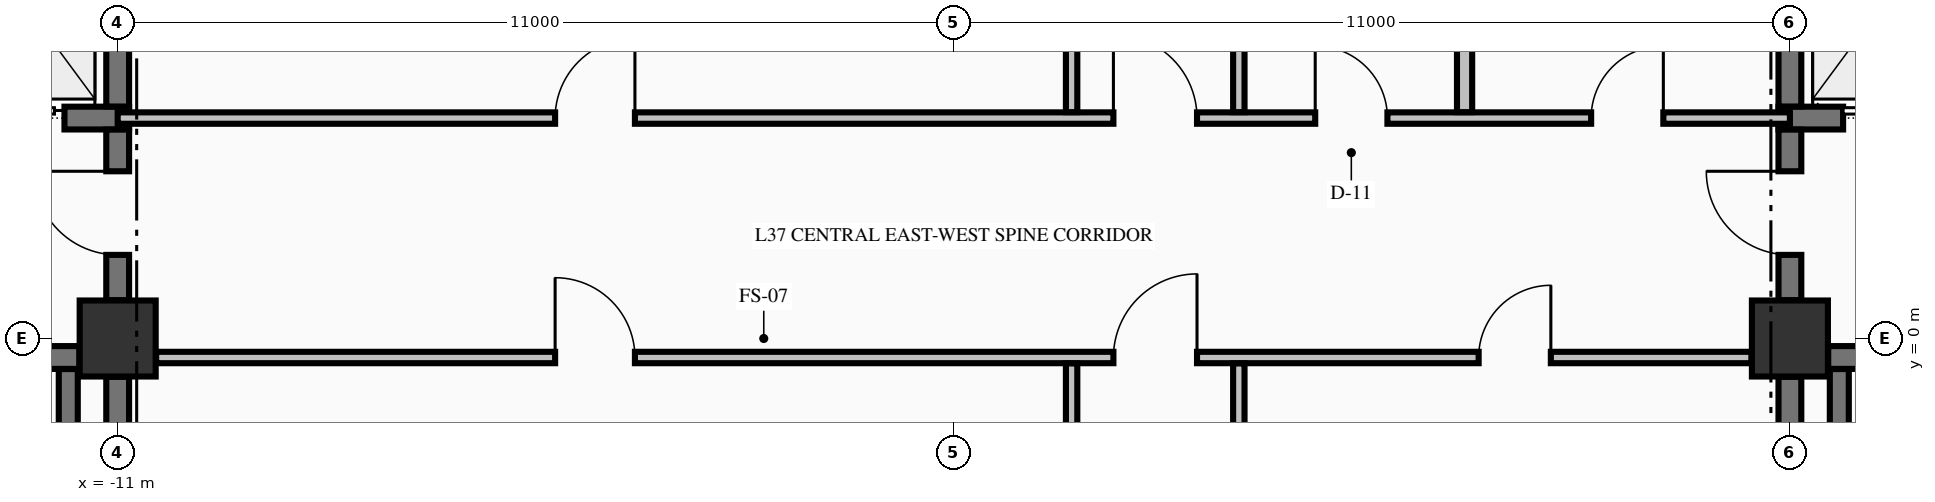
"""IFC4 building model, lengths in metres.
Left out: names, types, materials, properties, quantities, classifications, styles, units other than length and angle.
Written with IfcOpenShell. Run it as: python <this file> out.ifc"""

import sys

from ifc_helpers import new_model, si_unit, direction, frame, frame_2d, origin, origin_2d, place, context, subcontext, project, spatial, rectangle, extrude, element, fill, save


model = new_model("IFC4")
c1 = context("Model", 3, precision=1e-05, world=origin(), true_north=direction((0.0, 1.0)))
c2 = subcontext(c1, "Body", "Model", "MODEL_VIEW")
j1 = project(units=[si_unit("LENGTHUNIT", "METRE"), si_unit("PLANEANGLEUNIT", "RADIAN")], contexts=[c1])
p1 = place(None, origin())
s1 = spatial("IfcSite", under=j1, at=p1, CompositionType="ELEMENT")
p2 = place(p1, origin())
s2 = spatial("IfcBuilding", under=s1, at=p2, CompositionType="ELEMENT")
p3 = place(p2, frame((0.0, 0.0, 146.34)))
s3 = spatial("IfcBuildingStorey", under=s2, at=p3, CompositionType="ELEMENT", Elevation=146.34)
for number, where, z_axis, x_axis in (
    (1, (-11.0, 0.0, -0.25), (0.0, 0.0, 1.0), (1.0, 0.0, 0.0)),
    (2, (11.0, 0.0, -0.25), (0.0, 0.0, 1.0), (1.0, 0.0, 0.0)),
):
    element("IfcColumn", number, at=place(p3, frame(where, z_axis=z_axis, x_axis=x_axis)), inside=s3, PredefinedType="COLUMN", context=c2, shape_type="SweptSolid", body=[
        extrude(rectangle(XDim=1.0, YDim=1.0, at=origin_2d()), origin(), (0.0, 0.0, 1.0), 3.57),
    ])
p4 = place(p3, frame((-19.496, -0.25, 0.0), z_axis=(0.0, 0.0, 1.0), x_axis=(1.0, 0.0, 0.0)))
e3 = element("IfcWall", 3, at=p4, inside=s3, PredefinedType="SHEAR", context=c2, shape_type="SweptSolid", body=[
    extrude(rectangle(XDim=7.992, YDim=0.3, at=frame_2d((3.996, 0.0))), origin(), (0.0, 0.0, 1.0), 3.32),
])
p5 = place(p4, frame((5.796, 0.0, 0.0)))
e4 = element("IfcOpeningElement", 4, at=p5, cuts=e3, PredefinedType="OPENING", context=c2, shape_type="SweptSolid", body=[
    extrude(rectangle(XDim=1.1, YDim=2.15, at=frame_2d((0.55, 1.075))), frame((0.0, 0.16, 0.0), z_axis=(0.0, -1.0, 0.0), x_axis=(1.0, 0.0, 0.0)), (0.0, 0.0, 1.0), 0.32),
])
p6 = place(p3, frame((11.504, -0.25, 0.0), z_axis=(0.0, 0.0, 1.0), x_axis=(1.0, 0.0, 0.0)))
e5 = element("IfcWall", 5, at=p6, inside=s3, PredefinedType="SHEAR", context=c2, shape_type="SweptSolid", body=[
    extrude(rectangle(XDim=3.371, YDim=0.3, at=frame_2d((1.686, 0.0))), origin(), (0.0, 0.0, 1.0), 3.32),
])
p7 = place(p6, frame((1.096, 0.0, 0.0)))
e6 = element("IfcOpeningElement", 6, at=p7, cuts=e5, PredefinedType="OPENING", context=c2, shape_type="SweptSolid", body=[
    extrude(rectangle(XDim=1.1, YDim=2.15, at=frame_2d((0.55, 1.075))), frame((0.0, 0.16, 0.0), z_axis=(0.0, -1.0, 0.0), x_axis=(1.0, 0.0, 0.0)), (0.0, 0.0, 1.0), 0.32),
])
p8 = place(p3, frame((-14.875, 2.9, 0.0), z_axis=(0.0, 0.0, 1.0), x_axis=(1.0, 0.0, 0.0)))
e7 = element("IfcWall", 7, at=p8, inside=s3, PredefinedType="SHEAR", context=c2, shape_type="SweptSolid", body=[
    extrude(rectangle(XDim=4.025, YDim=0.3, at=frame_2d((2.012, 0.0))), origin(), (0.0, 0.0, 1.0), 3.32),
])
p9 = place(p8, frame((2.075, 0.0, 0.0)))
e8 = element("IfcOpeningElement", 8, at=p9, cuts=e7, PredefinedType="OPENING", context=c2, shape_type="SweptSolid", body=[
    extrude(rectangle(XDim=1.1, YDim=2.2, at=frame_2d((0.55, 1.1))), frame((0.0, 0.16, 0.0), z_axis=(0.0, -1.0, 0.0), x_axis=(1.0, 0.0, 0.0)), (0.0, 0.0, 1.0), 0.32),
])
p10 = place(p3, frame((10.85, 2.9, 0.0), z_axis=(0.0, 0.0, 1.0), x_axis=(1.0, 0.0, 0.0)))
e9 = element("IfcWall", 9, at=p10, inside=s3, PredefinedType="SHEAR", context=c2, shape_type="SweptSolid", body=[
    extrude(rectangle(XDim=4.025, YDim=0.3, at=frame_2d((2.012, 0.0))), origin(), (0.0, 0.0, 1.0), 3.32),
])
p11 = place(p10, frame((0.85, 0.0, 0.0)))
e10 = element("IfcOpeningElement", 10, at=p11, cuts=e9, PredefinedType="OPENING", context=c2, shape_type="SweptSolid", body=[
    extrude(rectangle(XDim=1.1, YDim=2.2, at=frame_2d((0.55, 1.1))), frame((0.0, 0.16, 0.0), z_axis=(0.0, -1.0, 0.0), x_axis=(1.0, 0.0, 0.0)), (0.0, 0.0, 1.0), 0.32),
])
p12 = place(p3, frame((-10.494, -0.25, 0.0), z_axis=(0.0, 0.0, 1.0), x_axis=(1.0, 0.0, 0.0)))
e11 = element("IfcWall", 11, at=p12, inside=s3, PredefinedType="PARTITIONING", context=c2, shape_type="SweptSolid", body=[
    extrude(rectangle(XDim=20.988, YDim=0.15, at=frame_2d((10.494, 0.0))), origin(), (0.0, 0.0, 1.0), 3.32),
])
p13 = place(p12, frame((12.594, 0.0, 0.0)))
e12 = element("IfcOpeningElement", 12, at=p13, cuts=e11, PredefinedType="OPENING", context=c2, shape_type="SweptSolid", body=[
    extrude(rectangle(XDim=1.1, YDim=2.15, at=frame_2d((0.55, 1.075))), frame((0.0, 0.085, 0.0), z_axis=(0.0, -1.0, 0.0), x_axis=(1.0, 0.0, 0.0)), (0.0, 0.0, 1.0), 0.17),
])
p14 = place(p12, frame((5.249, 0.0, 0.0)))
e13 = element("IfcOpeningElement", 13, at=p14, cuts=e11, PredefinedType="OPENING", context=c2, shape_type="SweptSolid", body=[
    extrude(rectangle(XDim=1.05, YDim=2.15, at=frame_2d((0.525, 1.075))), frame((0.0, 0.085, 0.0), z_axis=(0.0, -1.0, 0.0), x_axis=(1.0, 0.0, 0.0)), (0.0, 0.0, 1.0), 0.17),
])
p15 = place(p12, frame((17.399, 0.0, 0.0)))
e14 = element("IfcOpeningElement", 14, at=p15, cuts=e11, PredefinedType="OPENING", context=c2, shape_type="SweptSolid", body=[
    extrude(rectangle(XDim=0.95, YDim=2.15, at=frame_2d((0.475, 1.075))), frame((0.0, 0.085, 0.0), z_axis=(0.0, -1.0, 0.0), x_axis=(1.0, 0.0, 0.0)), (0.0, 0.0, 1.0), 0.17),
])
p16 = place(p3, frame((-11.0, 2.9, 0.0), z_axis=(0.0, 0.0, 1.0), x_axis=(1.0, 0.0, 0.0)))
e15 = element("IfcWall", 15, at=p16, inside=s3, PredefinedType="PARTITIONING", context=c2, shape_type="SweptSolid", body=[
    extrude(rectangle(XDim=22.0, YDim=0.15, at=frame_2d((11.0, 0.0))), origin(), (0.0, 0.0, 1.0), 3.32),
])
p17 = place(p16, frame((13.1, 0.0, 0.0)))
e16 = element("IfcOpeningElement", 16, at=p17, cuts=e15, PredefinedType="OPENING", context=c2, shape_type="SweptSolid", body=[
    extrude(rectangle(XDim=1.1, YDim=2.15, at=frame_2d((0.55, 1.075))), frame((0.0, 0.085, 0.0), z_axis=(0.0, -1.0, 0.0), x_axis=(1.0, 0.0, 0.0)), (0.0, 0.0, 1.0), 0.17),
])
p18 = place(p16, frame((5.755, 0.0, 0.0)))
e17 = element("IfcOpeningElement", 17, at=p18, cuts=e15, PredefinedType="OPENING", context=c2, shape_type="SweptSolid", body=[
    extrude(rectangle(XDim=1.05, YDim=2.15, at=frame_2d((0.525, 1.075))), frame((0.0, 0.085, 0.0), z_axis=(0.0, -1.0, 0.0), x_axis=(1.0, 0.0, 0.0)), (0.0, 0.0, 1.0), 0.17),
])
p19 = place(p16, frame((15.755, 0.0, 0.0)))
e18 = element("IfcOpeningElement", 18, at=p19, cuts=e15, PredefinedType="OPENING", context=c2, shape_type="SweptSolid", body=[
    extrude(rectangle(XDim=0.95, YDim=2.15, at=frame_2d((0.475, 1.075))), frame((0.0, 0.085, 0.0), z_axis=(0.0, -1.0, 0.0), x_axis=(1.0, 0.0, 0.0)), (0.0, 0.0, 1.0), 0.17),
])
p20 = place(p16, frame((19.385, 0.0, 0.0)))
e19 = element("IfcOpeningElement", 19, at=p20, cuts=e15, PredefinedType="OPENING", context=c2, shape_type="SweptSolid", body=[
    extrude(rectangle(XDim=0.95, YDim=2.15, at=frame_2d((0.475, 1.075))), frame((0.0, 0.085, 0.0), z_axis=(0.0, -1.0, 0.0), x_axis=(1.0, 0.0, 0.0)), (0.0, 0.0, 1.0), 0.17),
])
p21 = place(p3, frame((-11.65, -9.798, 0.0), z_axis=(0.0, 0.0, 1.0), x_axis=(0.0, 1.0, 0.0)))
e20 = element("IfcWall", 20, at=p21, inside=s3, PredefinedType="SOLIDWALL", context=c2, shape_type="SweptSolid", body=[
    extrude(rectangle(XDim=9.396, YDim=0.25, at=frame_2d((4.698, 0.0))), origin(), (0.0, 0.0, 1.0), 3.32),
])
p22 = place(p3, frame((-11.0, -9.446, 0.0), z_axis=(0.0, 0.0, 1.0), x_axis=(0.0, 1.0, 0.0)))
e21 = element("IfcWall", 21, at=p22, inside=s3, PredefinedType="SHEAR", context=c2, shape_type="SweptSolid", body=[
    extrude(rectangle(XDim=8.942, YDim=0.3, at=frame_2d((4.471, 0.0))), origin(), (0.0, 0.0, 1.0), 3.32),
])
p23 = place(p3, frame((-11.0, 0.504, 0.0), z_axis=(0.0, 0.0, 1.0), x_axis=(0.0, 1.0, 0.0)))
e22 = element("IfcWall", 22, at=p23, inside=s3, PredefinedType="SHEAR", context=c2, shape_type="SweptSolid", body=[
    extrude(rectangle(XDim=2.244, YDim=0.3, at=frame_2d((1.122, 0.0))), origin(), (0.0, 0.0, 1.0), 3.32),
])
p24 = place(p23, frame((0.596, 0.0, 0.0)))
e23 = element("IfcOpeningElement", 23, at=p24, cuts=e22, PredefinedType="OPENING", context=c2, shape_type="SweptSolid", body=[
    extrude(rectangle(XDim=1.1, YDim=2.15, at=frame_2d((0.55, 1.075))), frame((0.0, 0.16, 0.0), z_axis=(0.0, -1.0, 0.0), x_axis=(1.0, 0.0, 0.0)), (0.0, 0.0, 1.0), 0.32),
])
p25 = place(p3, frame((-11.0, 3.052, 0.0), z_axis=(0.0, 0.0, 1.0), x_axis=(0.0, 1.0, 0.0)))
e24 = element("IfcWall", 24, at=p25, inside=s3, PredefinedType="SHEAR", context=c2, shape_type="SweptSolid", body=[
    extrude(rectangle(XDim=2.496, YDim=0.3, at=frame_2d((1.248, 0.0))), origin(), (0.0, 0.0, 1.0), 3.32),
])
p26 = place(p3, frame((11.0, -9.446, 0.0), z_axis=(0.0, 0.0, 1.0), x_axis=(0.0, 1.0, 0.0)))
e25 = element("IfcWall", 25, at=p26, inside=s3, PredefinedType="SHEAR", context=c2, shape_type="SweptSolid", body=[
    extrude(rectangle(XDim=8.942, YDim=0.3, at=frame_2d((4.471, 0.0))), origin(), (0.0, 0.0, 1.0), 3.32),
])
p27 = place(p3, frame((11.0, 0.504, 0.0), z_axis=(0.0, 0.0, 1.0), x_axis=(0.0, 1.0, 0.0)))
e26 = element("IfcWall", 26, at=p27, inside=s3, PredefinedType="SHEAR", context=c2, shape_type="SweptSolid", body=[
    extrude(rectangle(XDim=2.244, YDim=0.3, at=frame_2d((1.122, 0.0))), origin(), (0.0, 0.0, 1.0), 3.32),
])
p28 = place(p27, frame((0.596, 0.0, 0.0)))
e27 = element("IfcOpeningElement", 27, at=p28, cuts=e26, PredefinedType="OPENING", context=c2, shape_type="SweptSolid", body=[
    extrude(rectangle(XDim=1.1, YDim=2.15, at=frame_2d((0.55, 1.075))), frame((0.0, 0.16, 0.0), z_axis=(0.0, -1.0, 0.0), x_axis=(1.0, 0.0, 0.0)), (0.0, 0.0, 1.0), 0.32),
])
p29 = place(p3, frame((11.0, 3.052, 0.0), z_axis=(0.0, 0.0, 1.0), x_axis=(0.0, 1.0, 0.0)))
e28 = element("IfcWall", 28, at=p29, inside=s3, PredefinedType="SHEAR", context=c2, shape_type="SweptSolid", body=[
    extrude(rectangle(XDim=2.496, YDim=0.3, at=frame_2d((1.248, 0.0))), origin(), (0.0, 0.0, 1.0), 3.32),
])
p30 = place(p3, frame((11.65, -9.798, 0.0), z_axis=(0.0, 0.0, 1.0), x_axis=(0.0, 1.0, 0.0)))
e29 = element("IfcWall", 29, at=p30, inside=s3, PredefinedType="SOLIDWALL", context=c2, shape_type="SweptSolid", body=[
    extrude(rectangle(XDim=9.396, YDim=0.25, at=frame_2d((4.698, 0.0))), origin(), (0.0, 0.0, 1.0), 3.32),
])
p31 = place(p3, frame((1.55, -9.872, 0.0), z_axis=(0.0, 0.0, 1.0), x_axis=(0.0, 1.0, 0.0)))
e30 = element("IfcWall", 30, at=p31, inside=s3, PredefinedType="PARTITIONING", context=c2, shape_type="SweptSolid", body=[
    extrude(rectangle(XDim=9.544, YDim=0.15, at=frame_2d((4.772, 0.0))), origin(), (0.0, 0.0, 1.0), 3.32),
])
p32 = place(p3, frame((1.55, 2.978, 0.0), z_axis=(0.0, 0.0, 1.0), x_axis=(0.0, 1.0, 0.0)))
e31 = element("IfcWall", 31, at=p32, inside=s3, PredefinedType="PARTITIONING", context=c2, shape_type="SweptSolid", body=[
    extrude(rectangle(XDim=7.444, YDim=0.15, at=frame_2d((3.722, 0.0))), origin(), (0.0, 0.0, 1.0), 3.32),
])
p33 = place(p3, frame((3.75, -4.147, 0.0), z_axis=(0.0, 0.0, 1.0), x_axis=(0.0, 1.0, 0.0)))
e32 = element("IfcWall", 32, at=p33, inside=s3, PredefinedType="PARTITIONING", context=c2, shape_type="SweptSolid", body=[
    extrude(rectangle(XDim=3.819, YDim=0.15, at=frame_2d((1.91, 0.0))), origin(), (0.0, 0.0, 1.0), 3.32),
])
p34 = place(p3, frame((3.75, 2.978, 0.0), z_axis=(0.0, 0.0, 1.0), x_axis=(0.0, 1.0, 0.0)))
e33 = element("IfcWall", 33, at=p34, inside=s3, PredefinedType="PARTITIONING", context=c2, shape_type="SweptSolid", body=[
    extrude(rectangle(XDim=7.444, YDim=0.15, at=frame_2d((3.722, 0.0))), origin(), (0.0, 0.0, 1.0), 3.32),
])
p35 = place(p3, frame((6.72, 2.978, 0.0), z_axis=(0.0, 0.0, 1.0), x_axis=(0.0, 1.0, 0.0)))
e34 = element("IfcWall", 34, at=p35, inside=s3, PredefinedType="PARTITIONING", context=c2, shape_type="SweptSolid", body=[
    extrude(rectangle(XDim=7.444, YDim=0.2, at=frame_2d((3.722, 0.0))), origin(), (0.0, 0.0, 1.0), 3.32),
])
p36 = place(p24, origin())
e35 = element("IfcDoor", 35, at=p36, inside=s3, OperationType="SINGLE_SWING_RIGHT", PredefinedType="DOOR", context=c2, shape_type="SweptSolid", body=[
    extrude(rectangle(XDim=1.1, YDim=2.15, at=frame_2d((0.55, 1.075))), frame((0.0, 0.025, 0.0), z_axis=(0.0, -1.0, 0.0), x_axis=(1.0, 0.0, 0.0)), (0.0, 0.0, 1.0), 0.05),
])
fill(e23, e35)
p37 = place(p9, origin())
e36 = element("IfcDoor", 36, at=p37, inside=s3, OperationType="SLIDING_TO_LEFT", PredefinedType="DOOR", context=c2, shape_type="SweptSolid", body=[
    extrude(rectangle(XDim=1.1, YDim=2.2, at=frame_2d((0.55, 1.1))), frame((0.0, 0.025, 0.0), z_axis=(0.0, -1.0, 0.0), x_axis=(1.0, 0.0, 0.0)), (0.0, 0.0, 1.0), 0.05),
])
fill(e8, e36)
p38 = place(p28, origin())
e37 = element("IfcDoor", 37, at=p38, inside=s3, OperationType="SINGLE_SWING_RIGHT", PredefinedType="DOOR", context=c2, shape_type="SweptSolid", body=[
    extrude(rectangle(XDim=1.1, YDim=2.15, at=frame_2d((0.55, 1.075))), frame((0.0, 0.025, 0.0), z_axis=(0.0, -1.0, 0.0), x_axis=(1.0, 0.0, 0.0)), (0.0, 0.0, 1.0), 0.05),
])
fill(e27, e37)
p39 = place(p11, origin())
e38 = element("IfcDoor", 38, at=p39, inside=s3, OperationType="SLIDING_TO_RIGHT", PredefinedType="DOOR", context=c2, shape_type="SweptSolid", body=[
    extrude(rectangle(XDim=1.1, YDim=2.2, at=frame_2d((0.55, 1.1))), frame((0.0, 0.025, 0.0), z_axis=(0.0, -1.0, 0.0), x_axis=(1.0, 0.0, 0.0)), (0.0, 0.0, 1.0), 0.05),
])
fill(e10, e38)
p40 = place(p17, origin())
e39 = element("IfcDoor", 39, at=p40, inside=s3, OperationType="SINGLE_SWING_LEFT", PredefinedType="DOOR", context=c2, shape_type="SweptSolid", body=[
    extrude(rectangle(XDim=1.1, YDim=2.15, at=frame_2d((0.55, 1.075))), frame((0.0, 0.025, 0.0), z_axis=(0.0, -1.0, 0.0), x_axis=(1.0, 0.0, 0.0)), (0.0, 0.0, 1.0), 0.05),
])
fill(e16, e39)
p41 = place(p13, origin())
e40 = element("IfcDoor", 40, at=p41, inside=s3, OperationType="SINGLE_SWING_RIGHT", PredefinedType="DOOR", context=c2, shape_type="SweptSolid", body=[
    extrude(rectangle(XDim=1.1, YDim=2.15, at=frame_2d((0.55, 1.075))), frame((0.0, 0.025, 0.0), z_axis=(0.0, -1.0, 0.0), x_axis=(1.0, 0.0, 0.0)), (0.0, 0.0, 1.0), 0.05),
])
fill(e12, e40)
p42 = place(p18, origin())
e41 = element("IfcDoor", 41, at=p42, inside=s3, OperationType="SINGLE_SWING_RIGHT", PredefinedType="DOOR", context=c2, shape_type="SweptSolid", body=[
    extrude(rectangle(XDim=1.05, YDim=2.15, at=frame_2d((0.525, 1.075))), frame((0.0, 0.025, 0.0), z_axis=(0.0, -1.0, 0.0), x_axis=(1.0, 0.0, 0.0)), (0.0, 0.0, 1.0), 0.05),
])
fill(e17, e41)
p43 = place(p19, origin())
e42 = element("IfcDoor", 42, at=p43, inside=s3, OperationType="SINGLE_SWING_LEFT", PredefinedType="DOOR", context=c2, shape_type="SweptSolid", body=[
    extrude(rectangle(XDim=0.95, YDim=2.15, at=frame_2d((0.475, 1.075))), frame((0.0, 0.025, 0.0), z_axis=(0.0, -1.0, 0.0), x_axis=(1.0, 0.0, 0.0)), (0.0, 0.0, 1.0), 0.05),
])
fill(e18, e42)
p44 = place(p20, origin())
e43 = element("IfcDoor", 43, at=p44, inside=s3, OperationType="SINGLE_SWING_RIGHT", PredefinedType="DOOR", context=c2, shape_type="SweptSolid", body=[
    extrude(rectangle(XDim=0.95, YDim=2.15, at=frame_2d((0.475, 1.075))), frame((0.0, 0.025, 0.0), z_axis=(0.0, -1.0, 0.0), x_axis=(1.0, 0.0, 0.0)), (0.0, 0.0, 1.0), 0.05),
])
fill(e19, e43)
p45 = place(p14, origin())
e44 = element("IfcDoor", 44, at=p45, inside=s3, OperationType="SINGLE_SWING_LEFT", PredefinedType="DOOR", context=c2, shape_type="SweptSolid", body=[
    extrude(rectangle(XDim=1.05, YDim=2.15, at=frame_2d((0.525, 1.075))), frame((0.0, 0.025, 0.0), z_axis=(0.0, -1.0, 0.0), x_axis=(1.0, 0.0, 0.0)), (0.0, 0.0, 1.0), 0.05),
])
fill(e13, e44)
p46 = place(p15, origin())
e45 = element("IfcDoor", 45, at=p46, inside=s3, OperationType="SINGLE_SWING_RIGHT", PredefinedType="DOOR", context=c2, shape_type="SweptSolid", body=[
    extrude(rectangle(XDim=0.95, YDim=2.15, at=frame_2d((0.475, 1.075))), frame((0.0, 0.025, 0.0), z_axis=(0.0, -1.0, 0.0), x_axis=(1.0, 0.0, 0.0)), (0.0, 0.0, 1.0), 0.05),
])
fill(e14, e45)
save(model, sys.argv[1])
